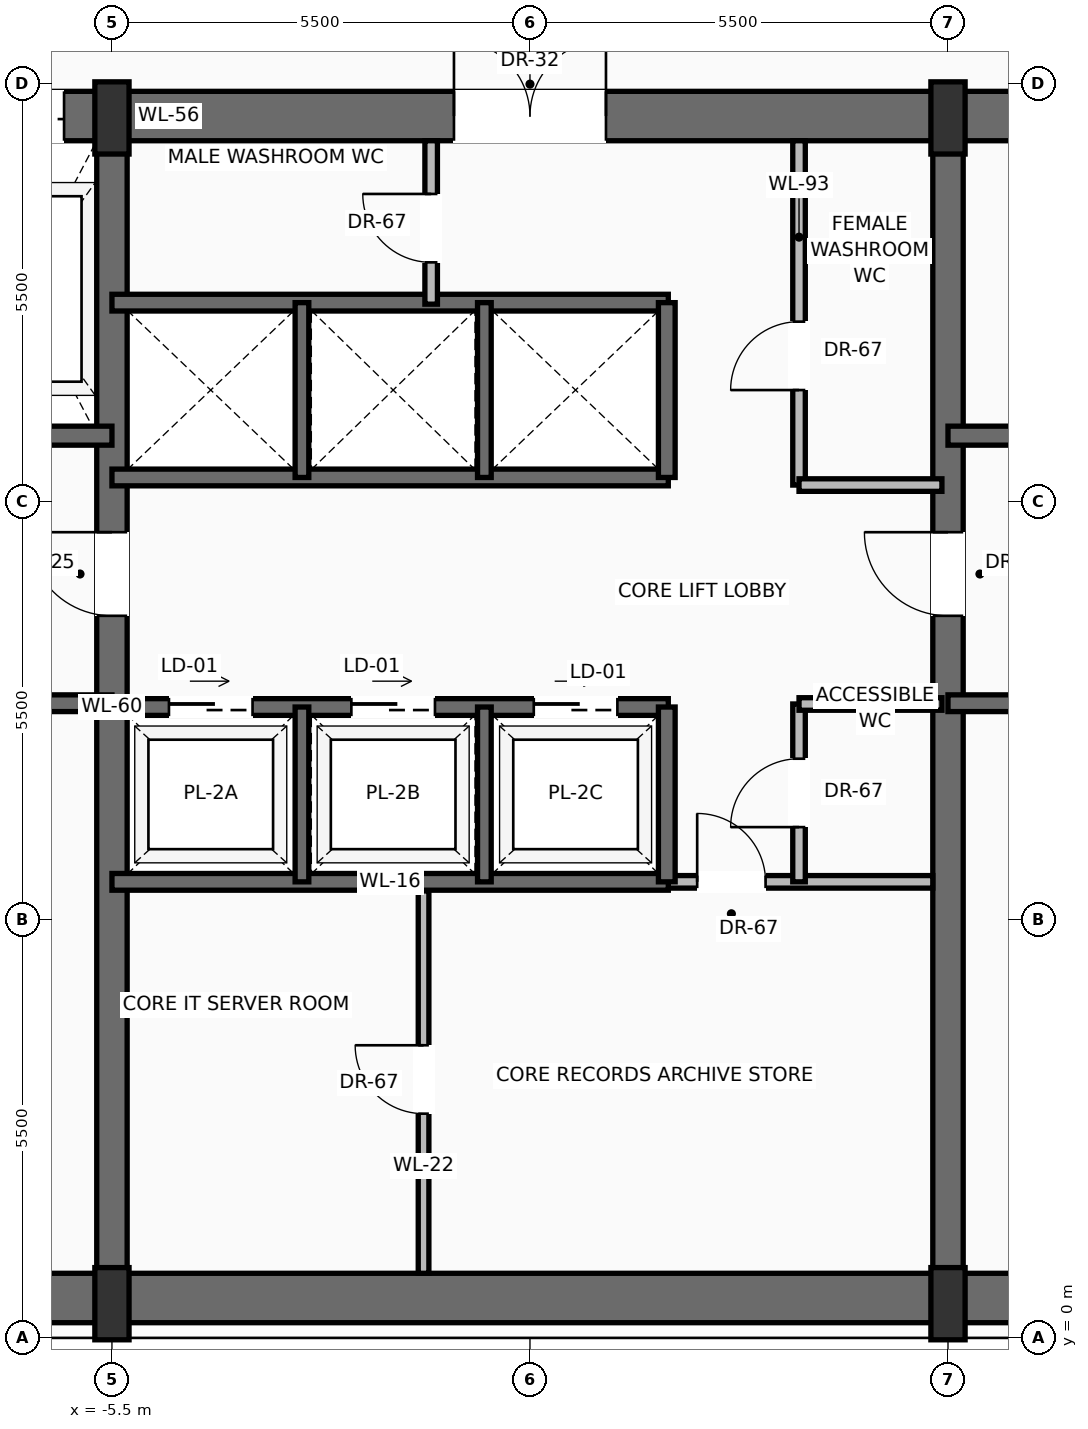
"""IFC4 building model, lengths in metres.
Left out: names, types, materials, properties, quantities, classifications, styles, units other than length and angle.
Written with IfcOpenShell. Run it as: python <this file> out.ifc"""

import sys

from ifc_helpers import new_model, si_unit, direction, frame, frame_2d, origin, origin_2d, place, context, subcontext, project, spatial, rectangle, extrude, source, transform, mapped, element, fill, save


model = new_model("IFC4")
c1 = context("Model", 3, precision=1e-05, world=origin(), true_north=direction((0.0, 1.0)))
c2 = subcontext(c1, "Body", "Model", "MODEL_VIEW")
j1 = project(units=[si_unit("LENGTHUNIT", "METRE"), si_unit("PLANEANGLEUNIT", "RADIAN")], contexts=[c1])
p1 = place(None, origin())
s1 = spatial("IfcSite", under=j1, at=p1, CompositionType="ELEMENT")
p2 = place(p1, origin())
s2 = spatial("IfcBuilding", under=s1, at=p2, CompositionType="ELEMENT")
p3 = place(p2, frame((0.0, 0.0, 151.5)))
s3 = spatial("IfcBuildingStorey", under=s2, at=p3, CompositionType="ELEMENT", Elevation=151.5)
p4 = place(p3, frame((-10.65, 0.525, 0.0), z_axis=(0.0, 0.0, 1.0), x_axis=(1.0, 0.0, 0.0)))
e1 = element("IfcWall", 1, at=p4, inside=s3, PredefinedType="SHEAR", context=c2, shape_type="SweptSolid", body=[
    extrude(rectangle(XDim=21.3, YDim=0.65, at=frame_2d((10.65, 0.0))), origin(), (0.0, 0.0, 1.0), 3.47),
])
p5 = place(p3, frame((-10.8, 16.075, 0.0), z_axis=(0.0, 0.0, 1.0), x_axis=(1.0, 0.0, 0.0)))
e2 = element("IfcWall", 2, at=p5, inside=s3, PredefinedType="SHEAR", context=c2, shape_type="SweptSolid", body=[
    extrude(rectangle(XDim=21.6, YDim=0.65, at=frame_2d((10.8, 0.0))), origin(), (0.0, 0.0, 1.0), 3.47),
])
p6 = place(p5, frame((3.37, 0.0, 0.0)))
e3 = element("IfcOpeningElement", 3, at=p6, cuts=e2, PredefinedType="OPENING", context=c2, shape_type="SweptSolid", body=[
    extrude(rectangle(XDim=1.3, YDim=2.3, at=frame_2d((0.65, 1.15))), frame((0.0, 0.335, 0.0), z_axis=(0.0, -1.0, 0.0), x_axis=(1.0, 0.0, 0.0)), (0.0, 0.0, 1.0), 0.67),
])
p7 = place(p5, frame((9.8, 0.0, 0.0)))
e4 = element("IfcOpeningElement", 4, at=p7, cuts=e2, PredefinedType="OPENING", context=c2, shape_type="SweptSolid", body=[
    extrude(rectangle(XDim=2.0, YDim=2.4, at=frame_2d((1.0, 1.2))), frame((0.0, 0.335, 0.0), z_axis=(0.0, -1.0, 0.0), x_axis=(1.0, 0.0, 0.0)), (0.0, 0.0, 1.0), 0.67),
])
p8 = place(p3, frame((-5.5, 0.525, 0.0), z_axis=(0.0, 0.0, 1.0), x_axis=(0.0, 1.0, 0.0)))
e5 = element("IfcWall", 5, at=p8, inside=s3, PredefinedType="SHEAR", context=c2, shape_type="SweptSolid", body=[
    extrude(rectangle(XDim=15.55, YDim=0.4, at=frame_2d((7.775, 0.0))), origin(), (0.0, 0.0, 1.0), 3.47),
])
p9 = place(p8, frame((8.975, 0.0, 0.0)))
e6 = element("IfcOpeningElement", 6, at=p9, cuts=e5, PredefinedType="OPENING", context=c2, shape_type="SweptSolid", body=[
    extrude(rectangle(XDim=1.1, YDim=2.2, at=frame_2d((0.55, 1.1))), frame((0.0, 0.21, 0.0), z_axis=(0.0, -1.0, 0.0), x_axis=(1.0, 0.0, 0.0)), (0.0, 0.0, 1.0), 0.42),
])
p10 = place(p3, frame((5.5, 0.525, 0.0), z_axis=(0.0, 0.0, 1.0), x_axis=(0.0, 1.0, 0.0)))
e7 = element("IfcWall", 7, at=p10, inside=s3, PredefinedType="SHEAR", context=c2, shape_type="SweptSolid", body=[
    extrude(rectangle(XDim=15.55, YDim=0.4, at=frame_2d((7.775, 0.0))), origin(), (0.0, 0.0, 1.0), 3.47),
])
p11 = place(p10, frame((8.975, 0.0, 0.0)))
e8 = element("IfcOpeningElement", 8, at=p11, cuts=e7, PredefinedType="OPENING", context=c2, shape_type="SweptSolid", body=[
    extrude(rectangle(XDim=1.1, YDim=2.2, at=frame_2d((0.55, 1.1))), frame((0.0, 0.21, 0.0), z_axis=(0.0, -1.0, 0.0), x_axis=(1.0, 0.0, 0.0)), (0.0, 0.0, 1.0), 0.42),
])
m1 = source(origin(), c2, "Body", "SweptSolid", [
    extrude(rectangle(XDim=0.45, YDim=0.95, at=origin_2d()), origin(), (0.0, 0.0, 1.0), 3.7),
])
for number, where, z_axis, x_axis in (
    (9, (-5.5, 0.45, 0.0), (0.0, 0.0, 1.0), (1.0, 0.0, 0.0)),
    (10, (5.5, 0.45, 0.0), (0.0, 0.0, 1.0), (1.0, 0.0, 0.0)),
    (11, (-5.5, 16.05, 0.0), (0.0, 0.0, 1.0), (1.0, 0.0, 0.0)),
    (12, (5.5, 16.05, 0.0), (0.0, 0.0, 1.0), (1.0, 0.0, 0.0)),
):
    element("IfcColumn", number, at=place(p3, frame(where, z_axis=z_axis, x_axis=x_axis)), inside=s3, PredefinedType="PILASTER", context=c2, shape_type="MappedRepresentation", body=[
        mapped(m1, transform((0.0, 0.0, 0.0), scale=1.0)),
    ])
p12 = place(p3, frame((-5.5, 8.35, 0.0), z_axis=(0.0, 0.0, 1.0), x_axis=(-1.0, 0.0, 0.0)))
e13 = element("IfcWall", 13, at=p12, inside=s3, PredefinedType="SOLIDWALL", context=c2, shape_type="SweptSolid", body=[
    extrude(rectangle(XDim=4.65, YDim=0.22, at=frame_2d((2.325, 0.0))), origin(), (0.0, 0.0, 1.0), 3.47),
])
p13 = place(p12, frame((2.5, 0.0, 0.0)))
e14 = element("IfcOpeningElement", 14, at=p13, cuts=e13, PredefinedType="OPENING", context=c2, shape_type="SweptSolid", body=[
    extrude(rectangle(XDim=1.15, YDim=2.2, at=frame_2d((0.575, 1.1))), frame((0.0, 0.12, 0.0), z_axis=(0.0, -1.0, 0.0), x_axis=(1.0, 0.0, 0.0)), (0.0, 0.0, 1.0), 0.24),
])
p14 = place(p3, frame((-5.5, 11.87, 0.0), z_axis=(0.0, 0.0, 1.0), x_axis=(-1.0, 0.0, 0.0)))
e15 = element("IfcWall", 15, at=p14, inside=s3, PredefinedType="SOLIDWALL", context=c2, shape_type="SweptSolid", body=[
    extrude(rectangle(XDim=4.65, YDim=0.25, at=frame_2d((2.325, 0.0))), origin(), (0.0, 0.0, 1.0), 3.47),
])
p15 = place(p14, frame((2.95, 0.0, 0.0)))
e16 = element("IfcOpeningElement", 16, at=p15, cuts=e15, PredefinedType="OPENING", context=c2, shape_type="SweptSolid", body=[
    extrude(rectangle(XDim=1.2, YDim=2.25, at=frame_2d((0.6, 1.125))), frame((0.0, 0.135, 0.0), z_axis=(0.0, -1.0, 0.0), x_axis=(1.0, 0.0, 0.0)), (0.0, 0.0, 1.0), 0.27),
])
p16 = place(p3, frame((10.15, 8.35, 0.0), z_axis=(0.0, 0.0, 1.0), x_axis=(-1.0, 0.0, 0.0)))
e17 = element("IfcWall", 17, at=p16, inside=s3, PredefinedType="SOLIDWALL", context=c2, shape_type="SweptSolid", body=[
    extrude(rectangle(XDim=4.65, YDim=0.22, at=frame_2d((2.325, 0.0))), origin(), (0.0, 0.0, 1.0), 3.47),
])
p17 = place(p16, frame((1.0, 0.0, 0.0)))
e18 = element("IfcOpeningElement", 18, at=p17, cuts=e17, PredefinedType="OPENING", context=c2, shape_type="SweptSolid", body=[
    extrude(rectangle(XDim=1.15, YDim=2.2, at=frame_2d((0.575, 1.1))), frame((0.0, 0.12, 0.0), z_axis=(0.0, -1.0, 0.0), x_axis=(1.0, 0.0, 0.0)), (0.0, 0.0, 1.0), 0.24),
])
p18 = place(p3, frame((10.15, 11.87, 0.0), z_axis=(0.0, 0.0, 1.0), x_axis=(-1.0, 0.0, 0.0)))
e19 = element("IfcWall", 19, at=p18, inside=s3, PredefinedType="SOLIDWALL", context=c2, shape_type="SweptSolid", body=[
    extrude(rectangle(XDim=4.65, YDim=0.25, at=frame_2d((2.325, 0.0))), origin(), (0.0, 0.0, 1.0), 3.47),
])
p19 = place(p18, frame((0.5, 0.0, 0.0)))
e20 = element("IfcOpeningElement", 20, at=p19, cuts=e19, PredefinedType="OPENING", context=c2, shape_type="SweptSolid", body=[
    extrude(rectangle(XDim=1.2, YDim=2.25, at=frame_2d((0.6, 1.125))), frame((0.0, 0.135, 0.0), z_axis=(0.0, -1.0, 0.0), x_axis=(1.0, 0.0, 0.0)), (0.0, 0.0, 1.0), 0.27),
])
p20 = place(p3, frame((1.82, 6.0, 0.0), z_axis=(0.0, 0.0, 1.0), x_axis=(1.0, 0.0, 0.0)))
e21 = element("IfcWall", 21, at=p20, inside=s3, PredefinedType="PARTITIONING", context=c2, shape_type="SweptSolid", body=[
    extrude(rectangle(XDim=3.48, YDim=0.165, at=frame_2d((1.74, 0.0))), origin(), (0.0, 0.0, 1.0), 3.462),
])
p21 = place(p20, frame((0.38, 0.0, 0.0)))
e22 = element("IfcOpeningElement", 22, at=p21, cuts=e21, PredefinedType="OPENING", context=c2, shape_type="SweptSolid", body=[
    extrude(rectangle(XDim=0.9, YDim=2.1, at=frame_2d((0.45, 1.05))), frame((0.0, 0.093, 0.0), z_axis=(0.0, -1.0, 0.0), x_axis=(1.0, 0.0, 0.0)), (0.0, 0.0, 1.0), 0.185),
])
p22 = place(p3, frame((-1.4, 0.85, 0.0), z_axis=(0.0, 0.0, 1.0), x_axis=(0.0, 1.0, 0.0)))
e23 = element("IfcWall", 23, at=p22, inside=s3, PredefinedType="PARTITIONING", context=c2, shape_type="SweptSolid", body=[
    extrude(rectangle(XDim=5.03, YDim=0.14, at=frame_2d((2.515, 0.0))), origin(), (0.0, 0.0, 1.0), 3.462),
])
p23 = place(p22, frame((2.1, 0.0, 0.0)))
e24 = element("IfcOpeningElement", 24, at=p23, cuts=e23, PredefinedType="OPENING", context=c2, shape_type="SweptSolid", body=[
    extrude(rectangle(XDim=0.9, YDim=2.1, at=frame_2d((0.45, 1.05))), frame((0.0, 0.08, 0.0), z_axis=(0.0, -1.0, 0.0), x_axis=(1.0, 0.0, 0.0)), (0.0, 0.0, 1.0), 0.16),
])
p24 = place(p3, frame((3.54, 6.0, 0.0), z_axis=(0.0, 0.0, 1.0), x_axis=(0.0, 1.0, 0.0)))
e25 = element("IfcWall", 25, at=p24, inside=s3, PredefinedType="PARTITIONING", context=c2, shape_type="SweptSolid", body=[
    extrude(rectangle(XDim=2.34, YDim=0.165, at=frame_2d((1.17, 0.0))), origin(), (0.0, 0.0, 1.0), 3.462),
])
p25 = place(p24, frame((0.72, 0.0, 0.0)))
e26 = element("IfcOpeningElement", 26, at=p25, cuts=e25, PredefinedType="OPENING", context=c2, shape_type="SweptSolid", body=[
    extrude(rectangle(XDim=0.9, YDim=2.1, at=frame_2d((0.45, 1.05))), frame((0.0, 0.093, 0.0), z_axis=(0.0, -1.0, 0.0), x_axis=(1.0, 0.0, 0.0)), (0.0, 0.0, 1.0), 0.185),
])
p26 = place(p3, frame((3.54, 8.34, 0.0), z_axis=(0.0, 0.0, 1.0), x_axis=(1.0, 0.0, 0.0)))
e27 = element("IfcWall", 27, at=p26, inside=s3, PredefinedType="PARTITIONING", context=c2, shape_type="SweptSolid", body=[
    extrude(rectangle(XDim=1.88, YDim=0.165, at=frame_2d((0.94, 0.0))), origin(), (0.0, 0.0, 1.0), 3.462),
])
p27 = place(p3, frame((-5.5, 6.0, 0.0), z_axis=(0.0, 0.0, 1.0), x_axis=(1.0, 0.0, 0.0)))
e28 = element("IfcWall", 28, at=p27, inside=s3, PredefinedType="SOLIDWALL", context=c2, shape_type="SweptSolid", body=[
    extrude(rectangle(XDim=7.32, YDim=0.22, at=frame_2d((3.66, 0.0))), origin(), (0.0, 0.0, 1.0), 3.47),
])
p28 = place(p3, frame((-5.5, 8.3, 0.0), z_axis=(0.0, 0.0, 1.0), x_axis=(1.0, 0.0, 0.0)))
e29 = element("IfcWall", 29, at=p28, inside=s3, PredefinedType="SOLIDWALL", context=c2, shape_type="SweptSolid", body=[
    extrude(rectangle(XDim=7.32, YDim=0.22, at=frame_2d((3.66, 0.0))), origin(), (0.0, 0.0, 1.0), 3.47),
])
p29 = place(p28, frame((0.75, 0.0, 0.0)))
e30 = element("IfcOpeningElement", 30, at=p29, cuts=e29, PredefinedType="OPENING", context=c2, shape_type="SweptSolid", body=[
    extrude(rectangle(XDim=1.1, YDim=2.2, at=frame_2d((0.55, 1.1))), frame((0.0, 0.12, 0.0), z_axis=(0.0, -1.0, 0.0), x_axis=(1.0, 0.0, 0.0)), (0.0, 0.0, 1.0), 0.24),
])
p30 = place(p28, frame((3.15, 0.0, 0.0)))
e31 = element("IfcOpeningElement", 31, at=p30, cuts=e29, PredefinedType="OPENING", context=c2, shape_type="SweptSolid", body=[
    extrude(rectangle(XDim=1.1, YDim=2.2, at=frame_2d((0.55, 1.1))), frame((0.0, 0.12, 0.0), z_axis=(0.0, -1.0, 0.0), x_axis=(1.0, 0.0, 0.0)), (0.0, 0.0, 1.0), 0.24),
])
p31 = place(p28, frame((5.55, 0.0, 0.0)))
e32 = element("IfcOpeningElement", 32, at=p31, cuts=e29, PredefinedType="OPENING", context=c2, shape_type="SweptSolid", body=[
    extrude(rectangle(XDim=1.1, YDim=2.2, at=frame_2d((0.55, 1.1))), frame((0.0, 0.12, 0.0), z_axis=(0.0, -1.0, 0.0), x_axis=(1.0, 0.0, 0.0)), (0.0, 0.0, 1.0), 0.24),
])
p32 = place(p3, frame((1.8, 6.0, 0.0), z_axis=(0.0, 0.0, 1.0), x_axis=(0.0, 1.0, 0.0)))
e33 = element("IfcWall", 33, at=p32, inside=s3, PredefinedType="SOLIDWALL", context=c2, shape_type="SweptSolid", body=[
    extrude(rectangle(XDim=2.3, YDim=0.22, at=frame_2d((1.15, 0.0))), origin(), (0.0, 0.0, 1.0), 3.47),
])
for number, where, z_axis, x_axis in (
    (34, (-3.0, 6.0, 0.0), (0.0, 0.0, 1.0), (0.0, 1.0, 0.0)),
    (35, (-0.6, 6.0, 0.0), (0.0, 0.0, 1.0), (0.0, 1.0, 0.0)),
):
    element("IfcWall", number, at=place(p3, frame(where, z_axis=z_axis, x_axis=x_axis)), inside=s3, PredefinedType="SOLIDWALL", context=c2, shape_type="SweptSolid", body=[
        extrude(rectangle(XDim=2.3, YDim=0.18, at=frame_2d((1.15, 0.0))), origin(), (0.0, 0.0, 1.0), 3.47),
    ])
for number, where, z_axis, x_axis in (
    (36, (-5.5, 11.32, 0.0), (0.0, 0.0, 1.0), (1.0, 0.0, 0.0)),
    (37, (-5.5, 13.62, 0.0), (0.0, 0.0, 1.0), (1.0, 0.0, 0.0)),
):
    element("IfcWall", number, at=place(p3, frame(where, z_axis=z_axis, x_axis=x_axis)), inside=s3, PredefinedType="SOLIDWALL", context=c2, shape_type="SweptSolid", body=[
        extrude(rectangle(XDim=7.32, YDim=0.22, at=frame_2d((3.66, 0.0))), origin(), (0.0, 0.0, 1.0), 3.47),
    ])
p33 = place(p3, frame((1.8, 11.32, 0.0), z_axis=(0.0, 0.0, 1.0), x_axis=(0.0, 1.0, 0.0)))
e38 = element("IfcWall", 38, at=p33, inside=s3, PredefinedType="SOLIDWALL", context=c2, shape_type="SweptSolid", body=[
    extrude(rectangle(XDim=2.3, YDim=0.22, at=frame_2d((1.15, 0.0))), origin(), (0.0, 0.0, 1.0), 3.47),
])
for number, where, z_axis, x_axis in (
    (39, (-3.0, 11.32, 0.0), (0.0, 0.0, 1.0), (0.0, 1.0, 0.0)),
    (40, (-0.6, 11.32, 0.0), (0.0, 0.0, 1.0), (0.0, 1.0, 0.0)),
):
    element("IfcWall", number, at=place(p3, frame(where, z_axis=z_axis, x_axis=x_axis)), inside=s3, PredefinedType="SOLIDWALL", context=c2, shape_type="SweptSolid", body=[
        extrude(rectangle(XDim=2.3, YDim=0.18, at=frame_2d((1.15, 0.0))), origin(), (0.0, 0.0, 1.0), 3.47),
    ])
p34 = place(p3, frame((-1.3, 13.6, 0.0), z_axis=(0.0, 0.0, 1.0), x_axis=(0.0, 1.0, 0.0)))
e41 = element("IfcWall", 41, at=p34, inside=s3, PredefinedType="PARTITIONING", context=c2, shape_type="SweptSolid", body=[
    extrude(rectangle(XDim=2.15, YDim=0.165, at=frame_2d((1.075, 0.0))), origin(), (0.0, 0.0, 1.0), 3.462),
])
p35 = place(p34, frame((0.55, 0.0, 0.0)))
e42 = element("IfcOpeningElement", 42, at=p35, cuts=e41, PredefinedType="OPENING", context=c2, shape_type="SweptSolid", body=[
    extrude(rectangle(XDim=0.9, YDim=2.1, at=frame_2d((0.45, 1.05))), frame((0.0, 0.093, 0.0), z_axis=(0.0, -1.0, 0.0), x_axis=(1.0, 0.0, 0.0)), (0.0, 0.0, 1.0), 0.185),
])
p36 = place(p3, frame((3.54, 11.22, 0.0), z_axis=(0.0, 0.0, 1.0), x_axis=(0.0, 1.0, 0.0)))
e43 = element("IfcWall", 43, at=p36, inside=s3, PredefinedType="PARTITIONING", context=c2, shape_type="SweptSolid", body=[
    extrude(rectangle(XDim=4.53, YDim=0.165, at=frame_2d((2.265, 0.0))), origin(), (0.0, 0.0, 1.0), 3.462),
])
p37 = place(p36, frame((1.25, 0.0, 0.0)))
e44 = element("IfcOpeningElement", 44, at=p37, cuts=e43, PredefinedType="OPENING", context=c2, shape_type="SweptSolid", body=[
    extrude(rectangle(XDim=0.9, YDim=2.1, at=frame_2d((0.45, 1.05))), frame((0.0, 0.093, 0.0), z_axis=(0.0, -1.0, 0.0), x_axis=(1.0, 0.0, 0.0)), (0.0, 0.0, 1.0), 0.185),
])
p38 = place(p3, frame((3.54, 11.22, 0.0), z_axis=(0.0, 0.0, 1.0), x_axis=(1.0, 0.0, 0.0)))
e45 = element("IfcWall", 45, at=p38, inside=s3, PredefinedType="PARTITIONING", context=c2, shape_type="SweptSolid", body=[
    extrude(rectangle(XDim=1.88, YDim=0.165, at=frame_2d((0.94, 0.0))), origin(), (0.0, 0.0, 1.0), 3.462),
])
m2 = source(origin(), c2, "Body", "SweptSolid", [
    extrude(rectangle(XDim=1.1, YDim=2.2, at=frame_2d((0.55, 1.1))), frame((0.0, 0.025, 0.0), z_axis=(0.0, -1.0, 0.0), x_axis=(1.0, 0.0, 0.0)), (0.0, 0.0, 1.0), 0.05),
])
p39 = place(p9, origin())
e46 = element("IfcDoor", 46, at=p39, inside=s3, OperationType="SINGLE_SWING_RIGHT", PredefinedType="DOOR", context=c2, shape_type="MappedRepresentation", body=[
    mapped(m2, transform((0.0, 0.0, 0.0), scale=1.0)),
])
fill(e6, e46)
m3 = source(origin(), c2, "Body", "SweptSolid", [
    extrude(rectangle(XDim=1.3, YDim=2.3, at=frame_2d((0.65, 1.15))), frame((0.0, 0.025, 0.0), z_axis=(0.0, -1.0, 0.0), x_axis=(1.0, 0.0, 0.0)), (0.0, 0.0, 1.0), 0.05),
])
p40 = place(p6, origin())
e47 = element("IfcDoor", 47, at=p40, inside=s3, OperationType="SLIDING_TO_RIGHT", PredefinedType="DOOR", context=c2, shape_type="MappedRepresentation", body=[
    mapped(m3, transform((0.0, 0.0, 0.0), scale=1.0)),
])
fill(e3, e47)
p41 = place(p11, origin())
e48 = element("IfcDoor", 48, at=p41, inside=s3, OperationType="SINGLE_SWING_RIGHT", PredefinedType="DOOR", context=c2, shape_type="MappedRepresentation", body=[
    mapped(m2, transform((0.0, 0.0, 0.0), scale=1.0)),
])
fill(e8, e48)
m4 = source(origin(), c2, "Body", "SweptSolid", [
    extrude(rectangle(XDim=2.0, YDim=2.4, at=frame_2d((1.0, 1.2))), frame((0.0, 0.025, 0.0), z_axis=(0.0, -1.0, 0.0), x_axis=(1.0, 0.0, 0.0)), (0.0, 0.0, 1.0), 0.05),
])
p42 = place(p7, origin())
e49 = element("IfcDoor", 49, at=p42, inside=s3, OperationType="DOUBLE_DOOR_SINGLE_SWING", PredefinedType="DOOR", context=c2, shape_type="MappedRepresentation", body=[
    mapped(m4, transform((0.0, 0.0, 0.0), scale=1.0)),
])
fill(e4, e49)
m5 = source(origin(), c2, "Body", "SweptSolid", [
    extrude(rectangle(XDim=0.9, YDim=2.1, at=frame_2d((0.45, 1.05))), frame((0.0, 0.025, 0.0), z_axis=(0.0, -1.0, 0.0), x_axis=(1.0, 0.0, 0.0)), (0.0, 0.0, 1.0), 0.05),
])
p43 = place(p21, origin())
e50 = element("IfcDoor", 50, at=p43, inside=s3, OperationType="SINGLE_SWING_LEFT", PredefinedType="DOOR", context=c2, shape_type="MappedRepresentation", body=[
    mapped(m5, transform((0.0, 0.0, 0.0), scale=1.0)),
])
fill(e22, e50)
p44 = place(p23, origin())
e51 = element("IfcDoor", 51, at=p44, inside=s3, OperationType="SINGLE_SWING_RIGHT", PredefinedType="DOOR", context=c2, shape_type="MappedRepresentation", body=[
    mapped(m5, transform((0.0, 0.0, 0.0), scale=1.0)),
])
fill(e24, e51)
p45 = place(p25, origin())
e52 = element("IfcDoor", 52, at=p45, inside=s3, OperationType="SINGLE_SWING_LEFT", PredefinedType="DOOR", context=c2, shape_type="MappedRepresentation", body=[
    mapped(m5, transform((0.0, 0.0, 0.0), scale=1.0)),
])
fill(e26, e52)
m6 = source(origin(), c2, "Body", "SweptSolid", [
    extrude(rectangle(XDim=1.1, YDim=2.2, at=frame_2d((0.55, 1.1))), frame((0.0, 0.025, 0.0), z_axis=(0.0, -1.0, 0.0), x_axis=(1.0, 0.0, 0.0)), (0.0, 0.0, 1.0), 0.05),
])
p46 = place(p29, origin())
e53 = element("IfcDoor", 53, at=p46, inside=s3, OperationType="SLIDING_TO_LEFT", PredefinedType="DOOR", context=c2, shape_type="MappedRepresentation", body=[
    mapped(m6, transform((0.0, 0.0, 0.0), scale=1.0)),
])
fill(e30, e53)
p47 = place(p30, origin())
e54 = element("IfcDoor", 54, at=p47, inside=s3, OperationType="SLIDING_TO_LEFT", PredefinedType="DOOR", context=c2, shape_type="MappedRepresentation", body=[
    mapped(m6, transform((0.0, 0.0, 0.0), scale=1.0)),
])
fill(e31, e54)
p48 = place(p31, origin())
e55 = element("IfcDoor", 55, at=p48, inside=s3, OperationType="SLIDING_TO_LEFT", PredefinedType="DOOR", context=c2, shape_type="MappedRepresentation", body=[
    mapped(m6, transform((0.0, 0.0, 0.0), scale=1.0)),
])
fill(e32, e55)
p49 = place(p35, origin())
e56 = element("IfcDoor", 56, at=p49, inside=s3, OperationType="SINGLE_SWING_RIGHT", PredefinedType="DOOR", context=c2, shape_type="MappedRepresentation", body=[
    mapped(m5, transform((0.0, 0.0, 0.0), scale=1.0)),
])
fill(e42, e56)
p50 = place(p37, origin())
e57 = element("IfcDoor", 57, at=p50, inside=s3, OperationType="SINGLE_SWING_LEFT", PredefinedType="DOOR", context=c2, shape_type="MappedRepresentation", body=[
    mapped(m5, transform((0.0, 0.0, 0.0), scale=1.0)),
])
fill(e44, e57)
save(model, sys.argv[1])
